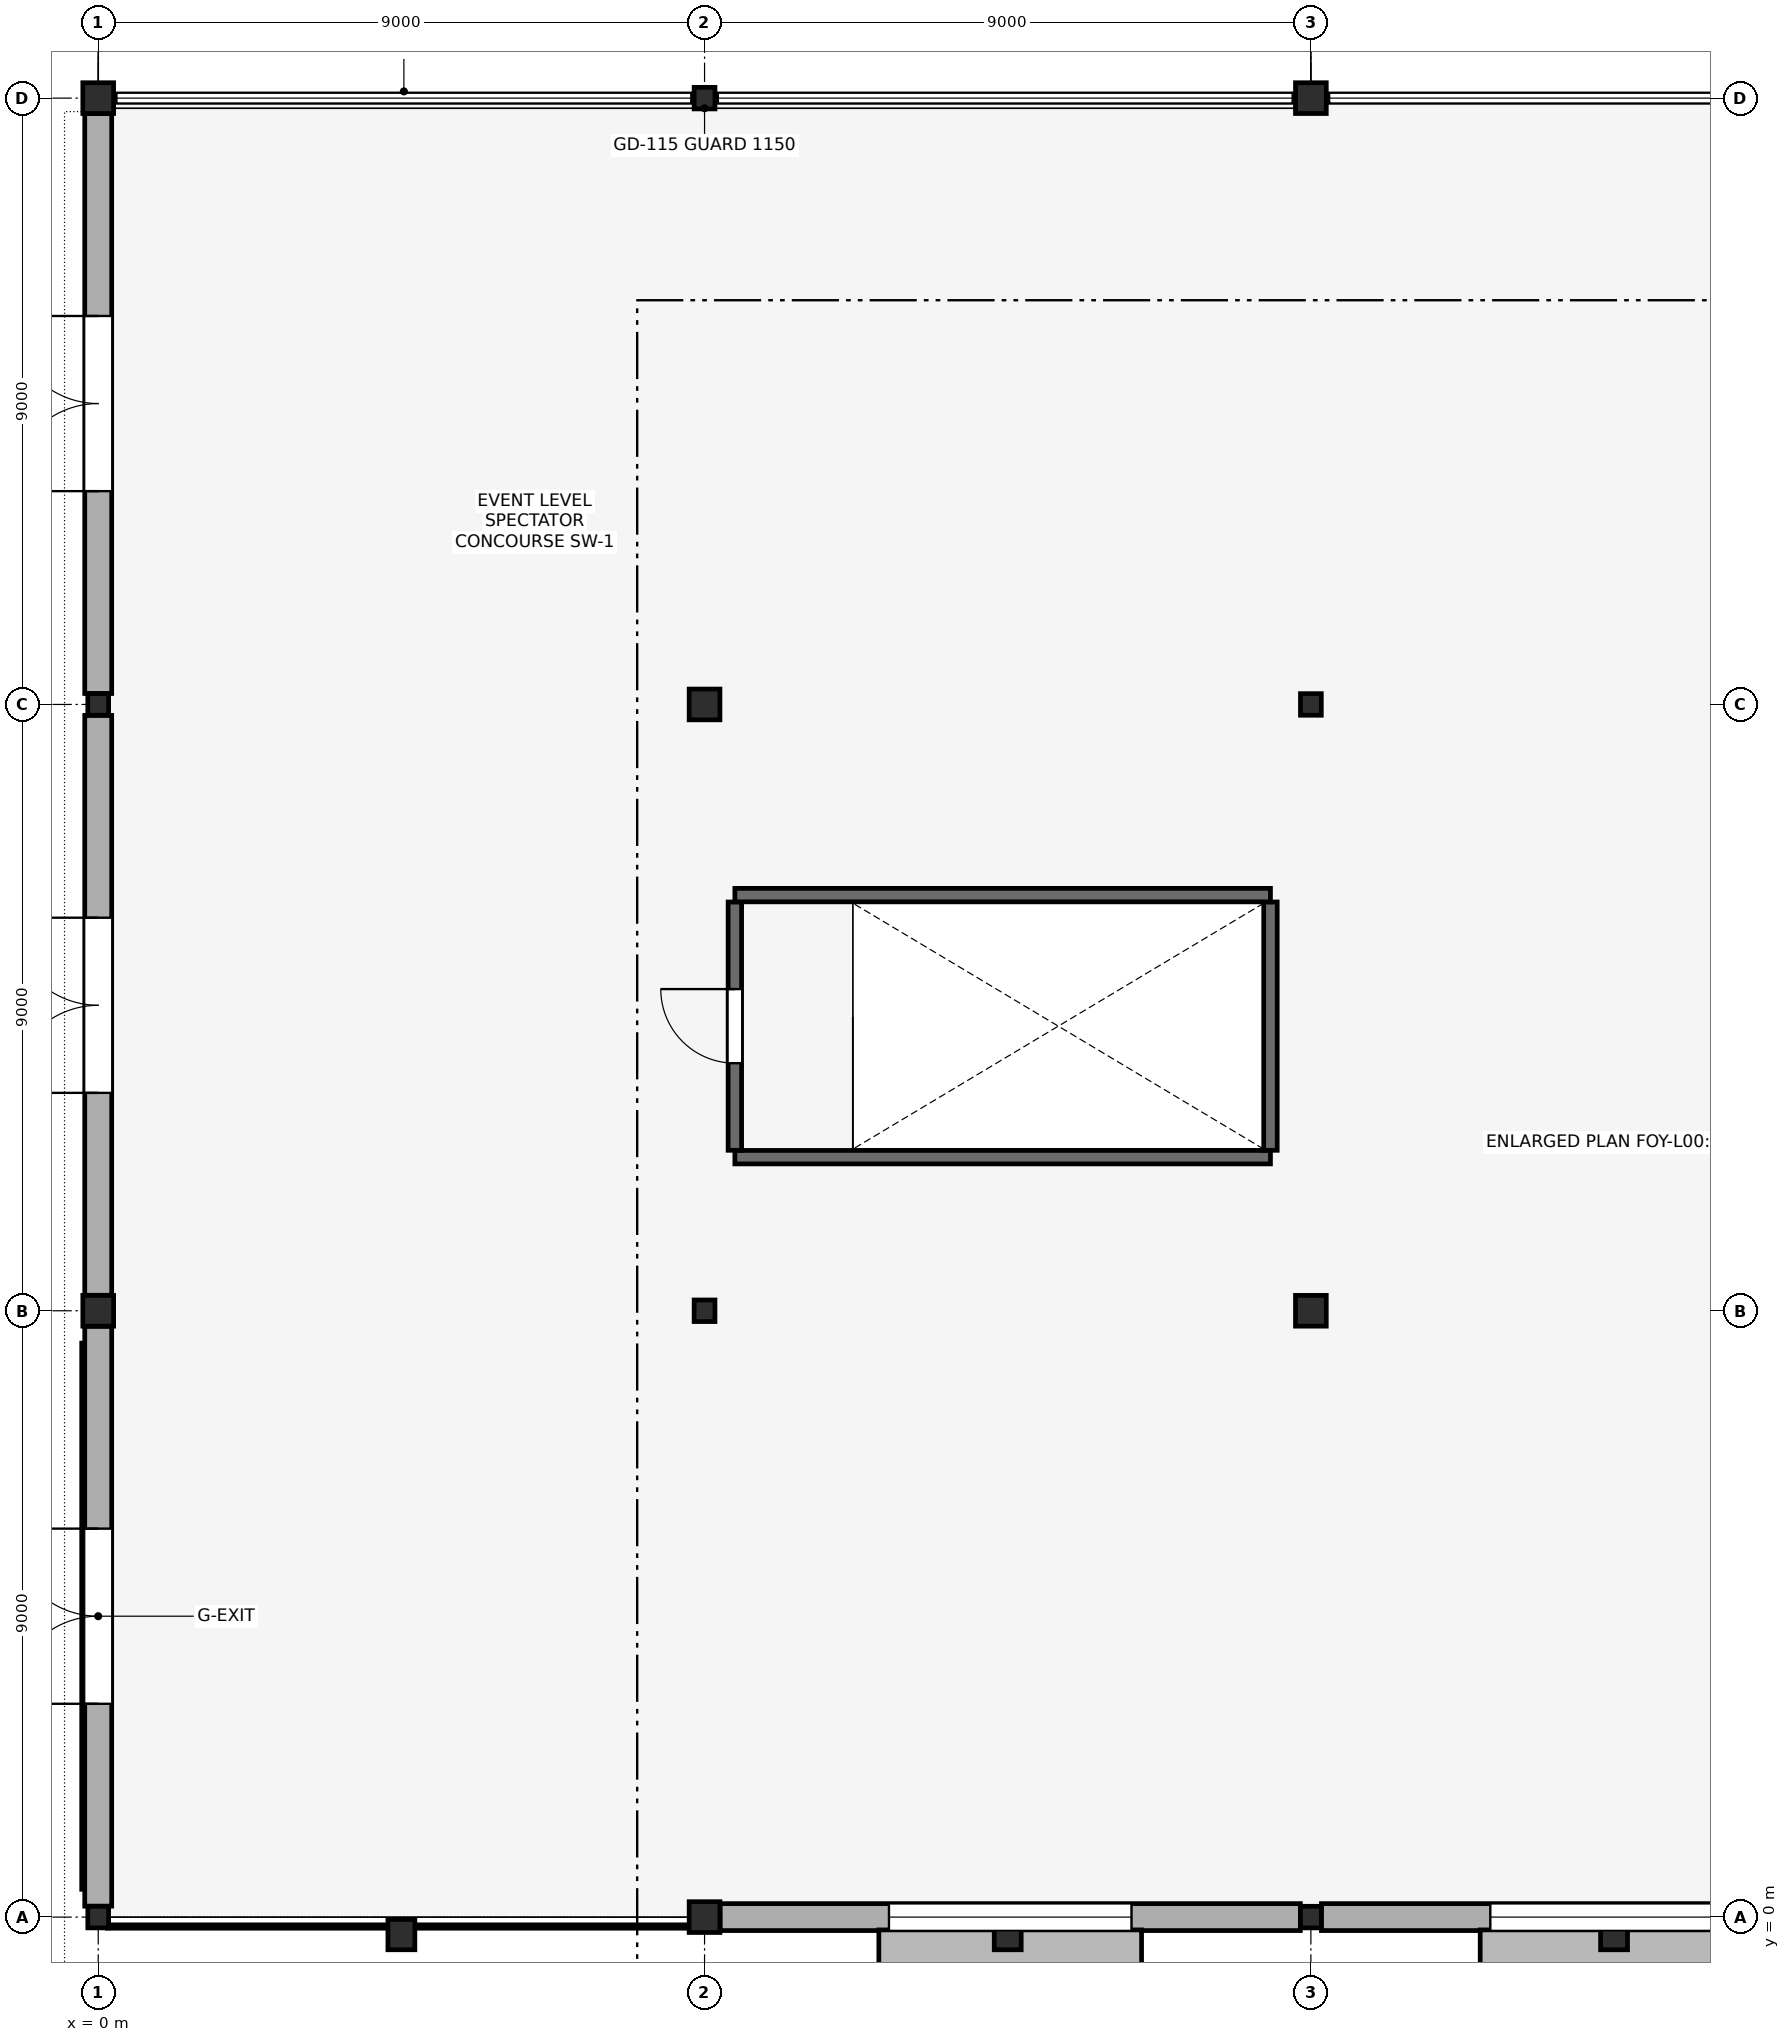
"""IFC4 building model, lengths in metres.
Left out: names, types, materials, properties, quantities, classifications, styles, units other than length and angle.
Written with IfcOpenShell. Run it as: python <this file> out.ifc"""

import sys

from ifc_helpers import new_model, si_unit, direction, frame, frame_2d, origin, origin_with_axes, origin_2d, place, context, subcontext, project, spatial, rectangle, hollow_circle, i_section, extrude, element, fill, save


model = new_model("IFC4")
c1 = context("Model", 3, precision=1e-05, world=origin(), true_north=direction((0.0, 1.0)))
c2 = subcontext(c1, "Body", "Model", "MODEL_VIEW")
j1 = project(units=[si_unit("LENGTHUNIT", "METRE"), si_unit("PLANEANGLEUNIT", "RADIAN")], contexts=[c1])
p1 = place(None, origin())
s1 = spatial("IfcSite", under=j1, at=p1, CompositionType="ELEMENT")
p2 = place(p1, origin())
s2 = spatial("IfcBuilding", under=s1, at=p2, CompositionType="ELEMENT")
p3 = place(p2, origin())
s3 = spatial("IfcBuildingStorey", under=s2, at=p3, CompositionType="ELEMENT", Elevation=0.0)
p4 = place(p3, origin_with_axes())
e1 = element("IfcColumn", 1, at=p4, inside=s3, PredefinedType="COLUMN", context=c2, shape_type="SweptSolid", body=[
    extrude(i_section(OverallWidth=0.309, OverallDepth=0.321, WebThickness=0.014, FlangeThickness=0.022, FilletRadius=0.015, at=origin_2d()), origin(), (0.0, 0.0, 1.0), 5.4),
])
p5 = place(p3, frame((0.0, 9.0, 0.0), z_axis=(0.0, 0.0, 1.0), x_axis=(1.0, 0.0, 0.0)))
e2 = element("IfcColumn", 2, at=p5, inside=s3, PredefinedType="COLUMN", context=c2, shape_type="SweptSolid", body=[
    extrude(hollow_circle(Radius=0.229, WallThickness=0.02, at=origin_2d()), origin(), (0.0, 0.0, 1.0), 5.4),
])
p6 = place(p3, frame((0.0, 18.0, 0.0), z_axis=(0.0, 0.0, 1.0), x_axis=(1.0, 0.0, 0.0)))
e3 = element("IfcColumn", 3, at=p6, inside=s3, PredefinedType="COLUMN", context=c2, shape_type="SweptSolid", body=[
    extrude(i_section(OverallWidth=0.309, OverallDepth=0.321, WebThickness=0.014, FlangeThickness=0.022, FilletRadius=0.015, at=origin_2d()), origin(), (0.0, 0.0, 1.0), 5.4),
])
for number, where, z_axis, x_axis in (
    (4, (0.0, 27.0, 0.0), (0.0, 0.0, 1.0), (1.0, 0.0, 0.0)),
    (5, (9.0, 0.0, 0.0), (0.0, 0.0, 1.0), (1.0, 0.0, 0.0)),
):
    element("IfcColumn", number, at=place(p3, frame(where, z_axis=z_axis, x_axis=x_axis)), inside=s3, PredefinedType="COLUMN", context=c2, shape_type="SweptSolid", body=[
        extrude(hollow_circle(Radius=0.229, WallThickness=0.02, at=origin_2d()), origin(), (0.0, 0.0, 1.0), 5.4),
    ])
p7 = place(p3, frame((9.0, 9.0, 0.0), z_axis=(0.0, 0.0, 1.0), x_axis=(1.0, 0.0, 0.0)))
e6 = element("IfcColumn", 6, at=p7, inside=s3, PredefinedType="COLUMN", context=c2, shape_type="SweptSolid", body=[
    extrude(i_section(OverallWidth=0.309, OverallDepth=0.321, WebThickness=0.014, FlangeThickness=0.022, FilletRadius=0.015, at=origin_2d()), origin(), (0.0, 0.0, 1.0), 5.4),
])
p8 = place(p3, frame((9.0, 18.0, 0.0), z_axis=(0.0, 0.0, 1.0), x_axis=(1.0, 0.0, 0.0)))
e7 = element("IfcColumn", 7, at=p8, inside=s3, PredefinedType="COLUMN", context=c2, shape_type="SweptSolid", body=[
    extrude(hollow_circle(Radius=0.229, WallThickness=0.02, at=origin_2d()), origin(), (0.0, 0.0, 1.0), 5.4),
])
for number, where, z_axis, x_axis in (
    (8, (9.0, 27.0, 0.0), (0.0, 0.0, 1.0), (1.0, 0.0, 0.0)),
    (9, (18.0, 0.0, 0.0), (0.0, 0.0, 1.0), (1.0, 0.0, 0.0)),
):
    element("IfcColumn", number, at=place(p3, frame(where, z_axis=z_axis, x_axis=x_axis)), inside=s3, PredefinedType="COLUMN", context=c2, shape_type="SweptSolid", body=[
        extrude(i_section(OverallWidth=0.309, OverallDepth=0.321, WebThickness=0.014, FlangeThickness=0.022, FilletRadius=0.015, at=origin_2d()), origin(), (0.0, 0.0, 1.0), 5.4),
    ])
p9 = place(p3, frame((18.0, 9.0, 0.0), z_axis=(0.0, 0.0, 1.0), x_axis=(1.0, 0.0, 0.0)))
e10 = element("IfcColumn", 10, at=p9, inside=s3, PredefinedType="COLUMN", context=c2, shape_type="SweptSolid", body=[
    extrude(hollow_circle(Radius=0.229, WallThickness=0.02, at=origin_2d()), origin(), (0.0, 0.0, 1.0), 5.4),
])
p10 = place(p3, frame((18.0, 18.0, 0.0), z_axis=(0.0, 0.0, 1.0), x_axis=(1.0, 0.0, 0.0)))
e11 = element("IfcColumn", 11, at=p10, inside=s3, PredefinedType="COLUMN", context=c2, shape_type="SweptSolid", body=[
    extrude(i_section(OverallWidth=0.309, OverallDepth=0.321, WebThickness=0.014, FlangeThickness=0.022, FilletRadius=0.015, at=origin_2d()), origin(), (0.0, 0.0, 1.0), 5.4),
])
p11 = place(p3, frame((18.0, 27.0, 0.0), z_axis=(0.0, 0.0, 1.0), x_axis=(1.0, 0.0, 0.0)))
e12 = element("IfcColumn", 12, at=p11, inside=s3, PredefinedType="COLUMN", context=c2, shape_type="SweptSolid", body=[
    extrude(hollow_circle(Radius=0.229, WallThickness=0.02, at=origin_2d()), origin(), (0.0, 0.0, 1.0), 5.4),
])
for number, where, z_axis, x_axis in (
    (13, (4.5, -0.26, 0.0), (0.0, 0.0, 1.0), (1.0, 0.0, 0.0)),
    (14, (13.5, -0.26, 0.0), (0.0, 0.0, 1.0), (1.0, 0.0, 0.0)),
    (15, (22.5, -0.26, 0.0), (0.0, 0.0, 1.0), (1.0, 0.0, 0.0)),
):
    element("IfcColumn", number, at=place(p3, frame(where, z_axis=z_axis, x_axis=x_axis)), inside=s3, PredefinedType="PILASTER", context=c2, shape_type="SweptSolid", body=[
        extrude(rectangle(XDim=0.4, YDim=0.45, at=origin_2d()), origin(), (0.0, 0.0, 1.0), 5.12),
    ])
p12 = place(p3, frame((26.77, 0.0, 0.0), z_axis=(0.0, 0.0, 1.0), x_axis=(-1.0, 0.0, 0.0)))
e16 = element("IfcWall", 16, at=p12, inside=s3, PredefinedType="STANDARD", context=c2, shape_type="SweptSolid", body=[
    extrude(rectangle(XDim=8.613, YDim=0.4, at=frame_2d((4.307, 0.0))), origin(), (0.0, 0.0, 1.0), 4.465),
])
p13 = place(p12, frame((2.506, 0.0, 0.85)))
e17 = element("IfcOpeningElement", 17, at=p13, cuts=e16, PredefinedType="OPENING", context=c2, shape_type="SweptSolid", body=[
    extrude(rectangle(XDim=3.6, YDim=2.4, at=frame_2d((1.8, 1.2))), frame((0.0, 0.21, 0.0), z_axis=(0.0, -1.0, 0.0), x_axis=(1.0, 0.0, 0.0)), (0.0, 0.0, 1.0), 0.42),
])
p14 = place(p3, frame((17.844, 0.0, 0.0), z_axis=(0.0, 0.0, 1.0), x_axis=(-1.0, 0.0, 0.0)))
e18 = element("IfcWall", 18, at=p14, inside=s3, PredefinedType="STANDARD", context=c2, shape_type="SweptSolid", body=[
    extrude(rectangle(XDim=8.613, YDim=0.4, at=frame_2d((4.307, 0.0))), origin(), (0.0, 0.0, 1.0), 4.465),
])
p15 = place(p14, frame((2.506, 0.0, 0.85)))
e19 = element("IfcOpeningElement", 19, at=p15, cuts=e18, PredefinedType="OPENING", context=c2, shape_type="SweptSolid", body=[
    extrude(rectangle(XDim=3.6, YDim=2.4, at=frame_2d((1.8, 1.2))), frame((0.0, 0.21, 0.0), z_axis=(0.0, -1.0, 0.0), x_axis=(1.0, 0.0, 0.0)), (0.0, 0.0, 1.0), 0.42),
])
p16 = place(p3, frame((0.0, 0.162, 0.0), z_axis=(0.0, 0.0, 1.0), x_axis=(0.0, 1.0, 0.0)))
e20 = element("IfcWall", 20, at=p16, inside=s3, PredefinedType="STANDARD", context=c2, shape_type="SweptSolid", body=[
    extrude(rectangle(XDim=8.607, YDim=0.4, at=frame_2d((4.304, 0.0))), origin(), (0.0, 0.0, 1.0), 4.815),
])
p17 = place(p16, frame((3.004, 0.0, 0.0)))
e21 = element("IfcOpeningElement", 21, at=p17, cuts=e20, PredefinedType="OPENING", context=c2, shape_type="SweptSolid", body=[
    extrude(rectangle(XDim=2.6, YDim=2.5, at=frame_2d((1.3, 1.25))), frame((0.0, 0.21, 0.0), z_axis=(0.0, -1.0, 0.0), x_axis=(1.0, 0.0, 0.0)), (0.0, 0.0, 1.0), 0.42),
])
p18 = place(p3, frame((0.0, 9.23, 0.0), z_axis=(0.0, 0.0, 1.0), x_axis=(0.0, 1.0, 0.0)))
e22 = element("IfcWall", 22, at=p18, inside=s3, PredefinedType="STANDARD", context=c2, shape_type="SweptSolid", body=[
    extrude(rectangle(XDim=8.607, YDim=0.4, at=frame_2d((4.304, 0.0))), origin(), (0.0, 0.0, 1.0), 4.815),
])
p19 = place(p18, frame((3.004, 0.0, 0.0)))
e23 = element("IfcOpeningElement", 23, at=p19, cuts=e22, PredefinedType="OPENING", context=c2, shape_type="SweptSolid", body=[
    extrude(rectangle(XDim=2.6, YDim=2.5, at=frame_2d((1.3, 1.25))), frame((0.0, 0.21, 0.0), z_axis=(0.0, -1.0, 0.0), x_axis=(1.0, 0.0, 0.0)), (0.0, 0.0, 1.0), 0.42),
])
p20 = place(p3, frame((0.0, 18.162, 0.0), z_axis=(0.0, 0.0, 1.0), x_axis=(0.0, 1.0, 0.0)))
e24 = element("IfcWall", 24, at=p20, inside=s3, PredefinedType="STANDARD", context=c2, shape_type="SweptSolid", body=[
    extrude(rectangle(XDim=8.607, YDim=0.4, at=frame_2d((4.304, 0.0))), origin(), (0.0, 0.0, 1.0), 4.815),
])
p21 = place(p20, frame((3.004, 0.0, 0.0)))
e25 = element("IfcOpeningElement", 25, at=p21, cuts=e24, PredefinedType="OPENING", context=c2, shape_type="SweptSolid", body=[
    extrude(rectangle(XDim=2.6, YDim=2.5, at=frame_2d((1.3, 1.25))), frame((0.0, 0.21, 0.0), z_axis=(0.0, -1.0, 0.0), x_axis=(1.0, 0.0, 0.0)), (0.0, 0.0, 1.0), 0.42),
])
p22 = place(p3, frame((9.45, 11.28, 0.0), z_axis=(0.0, 0.0, 1.0), x_axis=(1.0, 0.0, 0.0)))
e26 = element("IfcWall", 26, at=p22, inside=s3, PredefinedType="SHEAR", context=c2, shape_type="SweptSolid", body=[
    extrude(rectangle(XDim=7.95, YDim=0.2, at=frame_2d((3.975, 0.0))), origin(), (0.0, 0.0, 1.0), 5.4),
])
p23 = place(p3, frame((9.45, 11.382, 0.0), z_axis=(0.0, 0.0, 1.0), x_axis=(0.0, 1.0, 0.0)))
e27 = element("IfcWall", 27, at=p23, inside=s3, PredefinedType="SHEAR", context=c2, shape_type="SweptSolid", body=[
    extrude(rectangle(XDim=3.686, YDim=0.2, at=frame_2d((1.843, 0.0))), origin(), (0.0, 0.0, 1.0), 5.4),
])
p24 = place(p23, frame((1.293, 0.0, 0.0)))
e28 = element("IfcOpeningElement", 28, at=p24, cuts=e27, PredefinedType="OPENING", context=c2, shape_type="SweptSolid", body=[
    extrude(rectangle(XDim=1.1, YDim=2.15, at=frame_2d((0.55, 1.075))), frame((0.0, 0.11, 0.0), z_axis=(0.0, -1.0, 0.0), x_axis=(1.0, 0.0, 0.0)), (0.0, 0.0, 1.0), 0.22),
])
p25 = place(p3, frame((17.4, 11.382, 0.0), z_axis=(0.0, 0.0, 1.0), x_axis=(0.0, 1.0, 0.0)))
e29 = element("IfcWall", 29, at=p25, inside=s3, PredefinedType="SHEAR", context=c2, shape_type="SweptSolid", body=[
    extrude(rectangle(XDim=3.686, YDim=0.2, at=frame_2d((1.843, 0.0))), origin(), (0.0, 0.0, 1.0), 5.4),
])
p26 = place(p3, frame((9.45, 15.17, 0.0), z_axis=(0.0, 0.0, 1.0), x_axis=(1.0, 0.0, 0.0)))
e30 = element("IfcWall", 30, at=p26, inside=s3, PredefinedType="SHEAR", context=c2, shape_type="SweptSolid", body=[
    extrude(rectangle(XDim=7.95, YDim=0.2, at=frame_2d((3.975, 0.0))), origin(), (0.0, 0.0, 1.0), 5.4),
])
p27 = place(p13, origin())
e31 = element("IfcWindow", 31, at=p27, inside=s3, PartitioningType="SINGLE_PANEL", PredefinedType="WINDOW", context=c2, shape_type="SweptSolid", body=[
    extrude(rectangle(XDim=3.6, YDim=2.4, at=frame_2d((1.8, 1.2))), frame((0.0, 0.03, 0.0), z_axis=(0.0, -1.0, 0.0), x_axis=(1.0, 0.0, 0.0)), (0.0, 0.0, 1.0), 0.06),
])
fill(e17, e31)
p28 = place(p15, origin())
e32 = element("IfcWindow", 32, at=p28, inside=s3, PartitioningType="SINGLE_PANEL", PredefinedType="WINDOW", context=c2, shape_type="SweptSolid", body=[
    extrude(rectangle(XDim=3.6, YDim=2.4, at=frame_2d((1.8, 1.2))), frame((0.0, 0.03, 0.0), z_axis=(0.0, -1.0, 0.0), x_axis=(1.0, 0.0, 0.0)), (0.0, 0.0, 1.0), 0.06),
])
fill(e19, e32)
p29 = place(p17, origin())
e33 = element("IfcDoor", 33, at=p29, inside=s3, OperationType="DOUBLE_DOOR_SINGLE_SWING", PredefinedType="DOOR", context=c2, shape_type="SweptSolid", body=[
    extrude(rectangle(XDim=2.6, YDim=2.5, at=frame_2d((1.3, 1.25))), frame((0.0, 0.025, 0.0), z_axis=(0.0, -1.0, 0.0), x_axis=(1.0, 0.0, 0.0)), (0.0, 0.0, 1.0), 0.05),
])
fill(e21, e33)
p30 = place(p19, origin())
e34 = element("IfcDoor", 34, at=p30, inside=s3, OperationType="DOUBLE_DOOR_SINGLE_SWING", PredefinedType="DOOR", context=c2, shape_type="SweptSolid", body=[
    extrude(rectangle(XDim=2.6, YDim=2.5, at=frame_2d((1.3, 1.25))), frame((0.0, 0.025, 0.0), z_axis=(0.0, -1.0, 0.0), x_axis=(1.0, 0.0, 0.0)), (0.0, 0.0, 1.0), 0.05),
])
fill(e23, e34)
p31 = place(p21, origin())
e35 = element("IfcDoor", 35, at=p31, inside=s3, OperationType="DOUBLE_DOOR_SINGLE_SWING", PredefinedType="DOOR", context=c2, shape_type="SweptSolid", body=[
    extrude(rectangle(XDim=2.6, YDim=2.5, at=frame_2d((1.3, 1.25))), frame((0.0, 0.025, 0.0), z_axis=(0.0, -1.0, 0.0), x_axis=(1.0, 0.0, 0.0)), (0.0, 0.0, 1.0), 0.05),
])
fill(e25, e35)
p32 = place(p24, frame((1.1, 0.0, 0.0), z_axis=(0.0, 0.0, 1.0), x_axis=(-1.0, 0.0, 0.0)))
e36 = element("IfcDoor", 36, at=p32, inside=s3, OperationType="SINGLE_SWING_LEFT", PredefinedType="DOOR", context=c2, shape_type="SweptSolid", body=[
    extrude(rectangle(XDim=1.1, YDim=2.15, at=frame_2d((0.55, 1.075))), frame((0.0, 0.025, 0.0), z_axis=(0.0, -1.0, 0.0), x_axis=(1.0, 0.0, 0.0)), (0.0, 0.0, 1.0), 0.05),
])
fill(e28, e36)
save(model, sys.argv[1])
